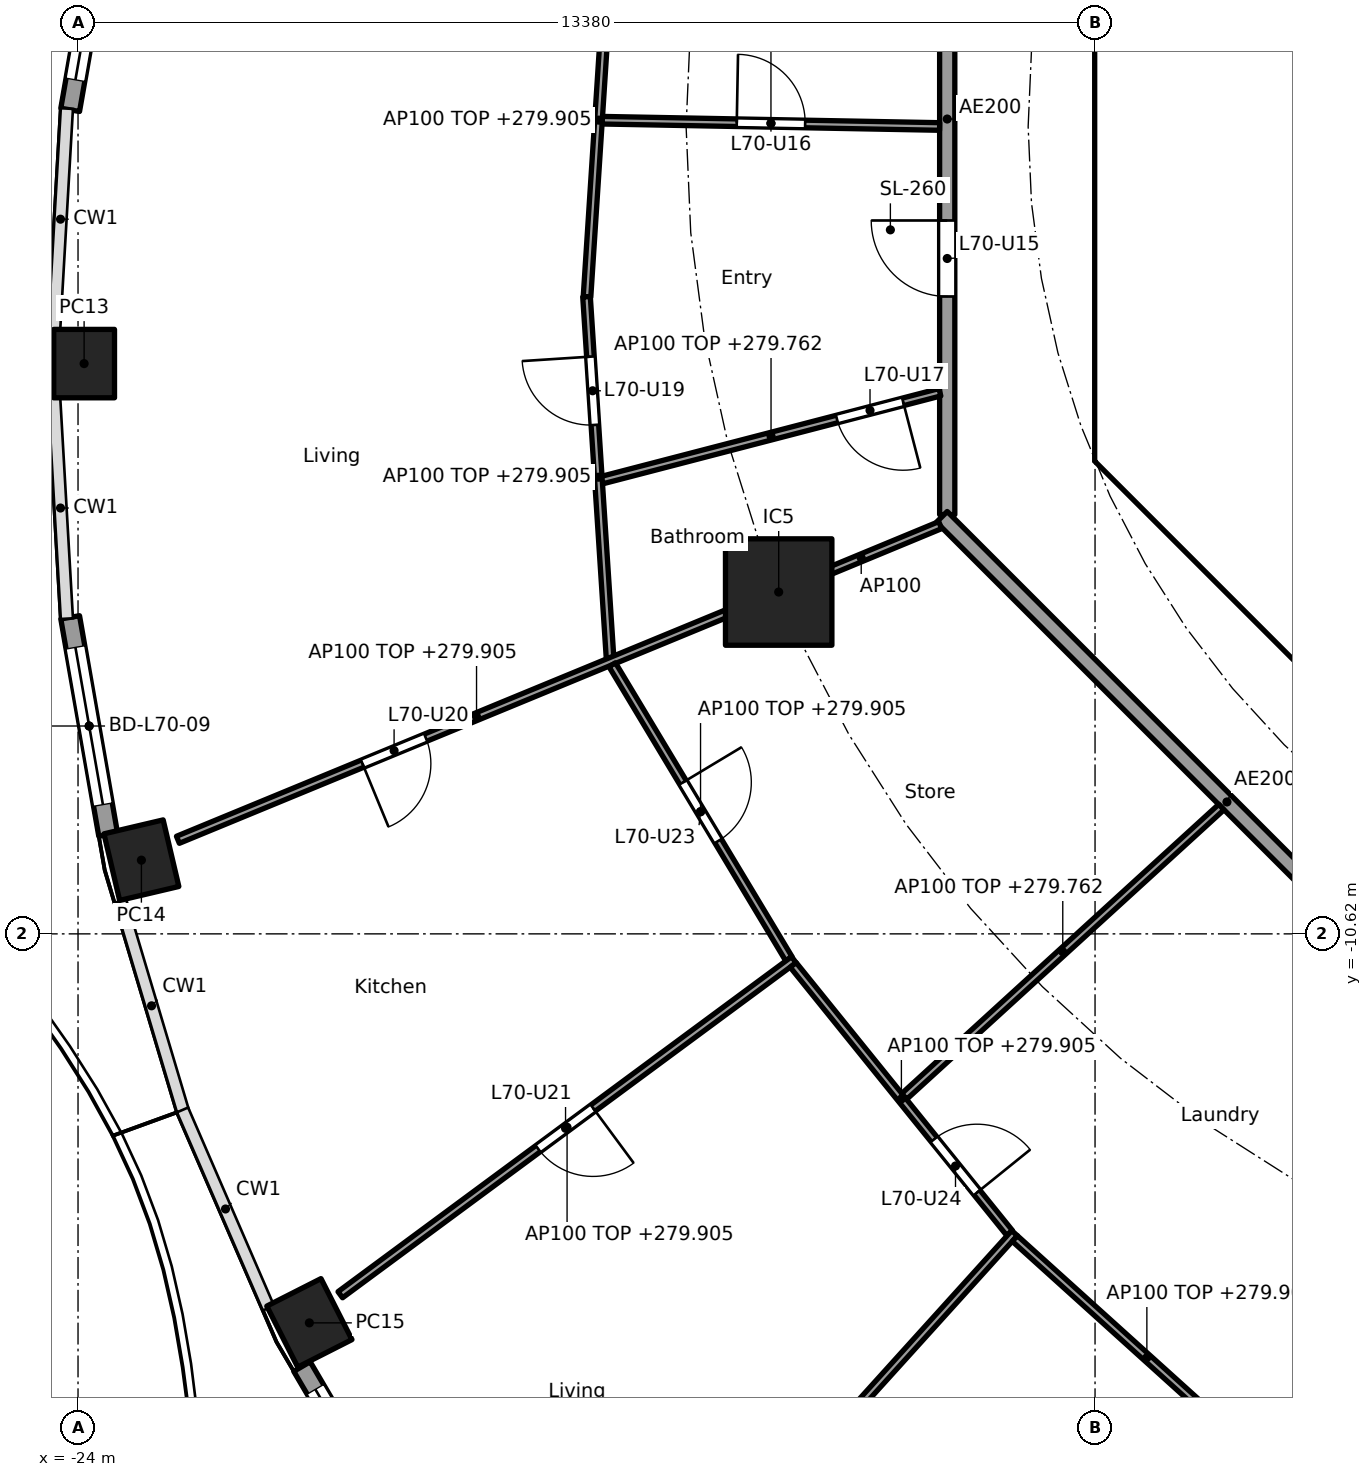
"""IFC4 building model, lengths in metres.
Left out: names, types, materials, properties, quantities, classifications, styles, units other than length and angle.
Written with IfcOpenShell. Run it as: python <this file> out.ifc"""

import sys

from ifc_helpers import new_model, si_unit, direction, frame, frame_2d, origin, origin_2d, place, context, subcontext, project, spatial, polyline, rectangle, hollow_rectangle, outline, extrude, element, fill, save


model = new_model("IFC4")
c1 = context("Model", 3, precision=1e-05, world=origin(), true_north=direction((0.0, 1.0)))
c2 = subcontext(c1, "Body", "Model", "MODEL_VIEW")
j1 = project(units=[si_unit("LENGTHUNIT", "METRE"), si_unit("PLANEANGLEUNIT", "RADIAN")], contexts=[c1])
p1 = place(None, origin())
s1 = spatial("IfcSite", under=j1, at=p1, CompositionType="ELEMENT")
p2 = place(p1, origin())
s2 = spatial("IfcBuilding", under=s1, at=p2, CompositionType="ELEMENT")
p3 = place(p2, frame((0.0, 0.0, 277.0)))
s3 = spatial("IfcBuildingStorey", under=s2, at=p3, CompositionType="ELEMENT", Elevation=277.0)
for number, where, z_axis, x_axis in (
    (1, (-23.92, -3.118, 0.0), (0.0, 0.0, 1.0), (0.0, -1.0, 0.0)),
    (2, (-23.166, -9.65, 0.0), (0.0, 0.0, 1.0), (0.229, -0.973, 0.0)),
    (3, (-20.957, -15.738, 0.0), (0.0, 0.0, 1.0), (0.452, -0.892, 0.0)),
):
    element("IfcColumn", number, at=place(p3, frame(where, z_axis=z_axis, x_axis=x_axis)), inside=s3, PredefinedType="COLUMN", context=c2, shape_type="SweptSolid", body=[
        extrude(hollow_rectangle(XDim=0.9, YDim=0.8, WallThickness=0.028, at=origin_2d()), origin(), (0.0, 0.0, 1.0), 3.7),
    ])
p4 = place(p3, frame((-14.782, -6.123, 0.0), z_axis=(0.0, 0.0, 1.0), x_axis=(1.0, 0.0, 0.0)))
e4 = element("IfcColumn", 4, at=p4, inside=s3, PredefinedType="COLUMN", context=c2, shape_type="SweptSolid", body=[
    extrude(rectangle(XDim=1.4, YDim=1.4, at=origin_2d()), origin(), (0.0, 0.0, 1.0), 3.7),
])
p5 = place(p3, frame((-24.103, 0.22, 0.0), z_axis=(0.0, 0.0, 1.0), x_axis=(0.172182411767, 0.985065082661, 0.0)))
e5 = element("IfcWall", 5, at=p5, inside=s3, PredefinedType="SOLIDWALL", context=c2, shape_type="SweptSolid", body=[
    extrude(rectangle(XDim=2.903, YDim=0.25, at=frame_2d((1.451, 0.0))), origin(), (0.0, 0.0, 1.0), 3.44),
])
p6 = place(p5, frame((0.401, 0.0, 0.0)))
e6 = element("IfcOpeningElement", 6, at=p6, cuts=e5, PredefinedType="OPENING", context=c2, shape_type="SweptSolid", body=[
    extrude(rectangle(XDim=2.1, YDim=2.4, at=frame_2d((1.05, 1.2))), frame((0.0, 0.135, 0.0), z_axis=(0.0, -1.0, 0.0), x_axis=(1.0, 0.0, 0.0)), (0.0, 0.0, 1.0), 0.27),
])
p7 = place(p3, frame((-23.604, -9.315, 0.0), z_axis=(0.0, 0.0, 1.0), x_axis=(-0.172182411767, 0.985065082661, 0.0)))
e7 = element("IfcWall", 7, at=p7, inside=s3, PredefinedType="SOLIDWALL", context=c2, shape_type="SweptSolid", body=[
    extrude(rectangle(XDim=2.903, YDim=0.25, at=frame_2d((1.451, 0.0))), origin(), (0.0, 0.0, 1.0), 3.44),
])
p8 = place(p7, frame((0.401, 0.0, 0.0)))
e8 = element("IfcOpeningElement", 8, at=p8, cuts=e7, PredefinedType="OPENING", context=c2, shape_type="SweptSolid", body=[
    extrude(rectangle(XDim=2.1, YDim=2.4, at=frame_2d((1.05, 1.2))), frame((0.0, 0.135, 0.0), z_axis=(0.0, -1.0, 0.0), x_axis=(1.0, 0.0, 0.0)), (0.0, 0.0, 1.0), 0.27),
])
p9 = place(p3, frame((-19.638, -18.724, 0.0), z_axis=(0.0, 0.0, 1.0), x_axis=(-0.506371364425, 0.862315511452, 0.0)))
e9 = element("IfcWall", 9, at=p9, inside=s3, PredefinedType="SOLIDWALL", context=c2, shape_type="SweptSolid", body=[
    extrude(rectangle(XDim=2.796, YDim=0.25, at=frame_2d((1.398, 0.0))), origin(), (0.0, 0.0, 1.0), 3.44),
])
p10 = place(p9, frame((0.348, 0.0, 0.0)))
e10 = element("IfcOpeningElement", 10, at=p10, cuts=e9, PredefinedType="OPENING", context=c2, shape_type="SweptSolid", body=[
    extrude(rectangle(XDim=2.1, YDim=2.4, at=frame_2d((1.05, 1.2))), frame((0.0, 0.135, 0.0), z_axis=(0.0, -1.0, 0.0), x_axis=(1.0, 0.0, 0.0)), (0.0, 0.0, 1.0), 0.27),
])
p11 = place(p3, frame((-10.325, 3.801, 0.0), z_axis=(0.0, 0.0, 1.0), x_axis=(0.0, -1.0, 0.0)))
e11 = element("IfcWall", 11, at=p11, inside=s3, PredefinedType="SHEAR", context=c2, shape_type="SweptSolid", body=[
    extrude(rectangle(XDim=7.602, YDim=0.6, at=frame_2d((3.801, 0.0))), origin(), (0.0, 0.0, 1.0), 3.44),
])
p12 = place(p11, frame((0.651, 0.0, 0.0)))
e12 = element("IfcOpeningElement", 12, at=p12, cuts=e11, PredefinedType="OPENING", context=c2, shape_type="SweptSolid", body=[
    extrude(rectangle(XDim=1.5, YDim=2.1, at=frame_2d((0.75, 1.05))), frame((0.0, 0.31, 0.0), z_axis=(0.0, -1.0, 0.0), x_axis=(1.0, 0.0, 0.0)), (0.0, 0.0, 1.0), 0.62),
])
p13 = place(p11, frame((5.451, 0.0, 0.0)))
e13 = element("IfcOpeningElement", 13, at=p13, cuts=e11, PredefinedType="OPENING", context=c2, shape_type="SweptSolid", body=[
    extrude(rectangle(XDim=1.5, YDim=2.1, at=frame_2d((0.75, 1.05))), frame((0.0, 0.31, 0.0), z_axis=(0.0, -1.0, 0.0), x_axis=(1.0, 0.0, 0.0)), (0.0, 0.0, 1.0), 0.62),
])
p14 = place(p3, frame((-9.988, -4.613, 0.0), z_axis=(0.0, 0.0, 1.0), x_axis=(0.707106781187, -0.707106781187, 0.0)))
e14 = element("IfcWall", 14, at=p14, inside=s3, PredefinedType="SHEAR", context=c2, shape_type="SweptSolid", body=[
    extrude(rectangle(XDim=7.602, YDim=0.6, at=frame_2d((3.801, 0.0))), origin(), (0.0, 0.0, 1.0), 3.44),
])
p15 = place(p14, frame((6.151, 0.0, 0.0)))
e15 = element("IfcOpeningElement", 15, at=p15, cuts=e14, PredefinedType="OPENING", context=c2, shape_type="SweptSolid", body=[
    extrude(rectangle(XDim=1.1, YDim=2.1, at=frame_2d((0.55, 1.05))), frame((0.0, 0.31, 0.0), z_axis=(0.0, -1.0, 0.0), x_axis=(1.0, 0.0, 0.0)), (0.0, 0.0, 1.0), 0.62),
])
p16 = place(p3, origin())
e16 = element("IfcWall", 16, at=p16, inside=s3, PredefinedType="SHEAR", context=c2, shape_type="SweptSolid", body=[
    extrude(outline(polyline([(-10.625, -3.801), (-10.025, -3.801), (-10.025, -4.152), (-9.776, -4.401), (-10.2, -4.825), (-10.625, -4.401), (-10.625, -3.801)])), origin(), (0.0, 0.0, 1.0), 3.44),
])
p17 = place(p3, frame((-10.025, -4.0, 0.0), z_axis=(0.0, 0.0, 1.0), x_axis=(1.0, 0.0, 0.0)))
e17 = element("IfcWall", 17, at=p17, inside=s3, PredefinedType="PARTITIONING", context=c2, shape_type="SweptSolid", body=[
    extrude(rectangle(XDim=3.325, YDim=0.2, at=frame_2d((1.662, 0.0))), origin(), (0.0, 0.0, 1.0), 3.44),
])
p18 = place(p3, frame((-8.301, -5.8, 0.0), z_axis=(0.0, 0.0, 1.0), x_axis=(1.0, 0.0, 0.0)))
e18 = element("IfcWall", 18, at=p18, inside=s3, PredefinedType="PARTITIONING", context=c2, shape_type="SweptSolid", body=[
    extrude(rectangle(XDim=2.026, YDim=0.15, at=frame_2d((1.013, 0.0))), origin(), (0.0, 0.0, 1.0), 3.44),
])
p19 = place(p3, frame((-6.151, -14.824, 0.0), z_axis=(0.0, 0.0, 1.0), x_axis=(-0.549345577828, -0.835595258556, 0.0)))
e19 = element("IfcWall", 19, at=p19, inside=s3, PredefinedType="PARTITIONING", context=c2, shape_type="SweptSolid", body=[
    extrude(rectangle(XDim=11.62, YDim=0.2, at=frame_2d((5.81, 0.0))), origin(), (0.0, 0.0, 1.0), 2.905),
])
p20 = place(p3, frame((-12.565, 5.304, 0.0), z_axis=(0.0, 0.0, 1.0), x_axis=(0.0, -1.0, 0.0)))
e20 = element("IfcWall", 20, at=p20, inside=s3, PredefinedType="PARTITIONING", context=c2, shape_type="SweptSolid", body=[
    extrude(rectangle(XDim=10.409, YDim=0.2, at=frame_2d((5.205, 0.0))), origin(), (0.0, 0.0, 1.0), 3.44),
])
p21 = place(p20, frame((6.539, 0.0, 0.0)))
e21 = element("IfcOpeningElement", 21, at=p21, cuts=e20, PredefinedType="OPENING", context=c2, shape_type="SweptSolid", body=[
    extrude(rectangle(XDim=1.0, YDim=2.1, at=frame_2d((0.5, 1.05))), frame((0.0, 0.11, 0.0), z_axis=(0.0, -1.0, 0.0), x_axis=(1.0, 0.0, 0.0)), (0.0, 0.0, 1.0), 0.22),
])
p22 = place(p3, frame((-12.635, -5.134, 0.0), z_axis=(0.0, 0.0, 1.0), x_axis=(0.707106781187, -0.707106781187, 0.0)))
e22 = element("IfcWall", 22, at=p22, inside=s3, PredefinedType="PARTITIONING", context=c2, shape_type="SweptSolid", body=[
    extrude(rectangle(XDim=10.609, YDim=0.2, at=frame_2d((5.305, 0.0))), origin(), (0.0, 0.0, 1.0), 3.44),
])
p23 = place(p3, frame((-17.002, 2.409, 0.0), z_axis=(0.0, 0.0, 1.0), x_axis=(-0.064855550758, -0.997894662545, 0.0)))
e23 = element("IfcWall", 23, at=p23, inside=s3, PredefinedType="PARTITIONING", context=c2, shape_type="SweptSolid", body=[
    extrude(rectangle(XDim=4.656, YDim=0.1, at=frame_2d((2.328, 0.0))), origin(), (0.0, 0.0, 1.0), 2.905),
])
p24 = place(p3, frame((-12.665, 0.002, 0.0), z_axis=(0.0, 0.0, 1.0), x_axis=(-0.999827178165, 0.018590691287, 0.0)))
e24 = element("IfcWall", 24, at=p24, inside=s3, PredefinedType="PARTITIONING", context=c2, shape_type="SweptSolid", body=[
    extrude(rectangle(XDim=4.439, YDim=0.1, at=frame_2d((2.219, 0.0))), origin(), (0.0, 0.0, 1.0), 2.762),
])
p25 = place(p24, frame((1.769, 0.0, 0.0)))
e25 = element("IfcOpeningElement", 25, at=p25, cuts=e24, PredefinedType="OPENING", context=c2, shape_type="SweptSolid", body=[
    extrude(rectangle(XDim=0.9, YDim=2.1, at=frame_2d((0.45, 1.05))), frame((0.0, 0.06, 0.0), z_axis=(0.0, -1.0, 0.0), x_axis=(1.0, 0.0, 0.0)), (0.0, 0.0, 1.0), 0.12),
])
p26 = place(p3, frame((-17.31, -2.238, 0.0), z_axis=(0.0, 0.0, 1.0), x_axis=(0.064949202176, -0.997888571503, 0.0)))
e26 = element("IfcWall", 26, at=p26, inside=s3, PredefinedType="PARTITIONING", context=c2, shape_type="SweptSolid", body=[
    extrude(rectangle(XDim=4.759, YDim=0.1, at=frame_2d((2.379, 0.0))), origin(), (0.0, 0.0, 1.0), 2.905),
])
p27 = place(p26, frame((0.79, 0.0, 0.0)))
e27 = element("IfcOpeningElement", 27, at=p27, cuts=e26, PredefinedType="OPENING", context=c2, shape_type="SweptSolid", body=[
    extrude(rectangle(XDim=0.9, YDim=2.1, at=frame_2d((0.45, 1.05))), frame((0.0, 0.06, 0.0), z_axis=(0.0, -1.0, 0.0), x_axis=(1.0, 0.0, 0.0)), (0.0, 0.0, 1.0), 0.12),
])
p28 = place(p3, frame((-12.662, -3.495, 0.0), z_axis=(0.0, 0.0, 1.0), x_axis=(-0.967834941053, -0.251586022817, 0.0)))
e28 = element("IfcWall", 28, at=p28, inside=s3, PredefinedType="PARTITIONING", context=c2, shape_type="SweptSolid", body=[
    extrude(rectangle(XDim=4.59, YDim=0.1, at=frame_2d((2.295, 0.0))), origin(), (0.0, 0.0, 1.0), 2.762),
])
p29 = place(p28, frame((0.5, 0.0, 0.0)))
e29 = element("IfcOpeningElement", 29, at=p29, cuts=e28, PredefinedType="OPENING", context=c2, shape_type="SweptSolid", body=[
    extrude(rectangle(XDim=0.9, YDim=2.1, at=frame_2d((0.45, 1.05))), frame((0.0, 0.06, 0.0), z_axis=(0.0, -1.0, 0.0), x_axis=(1.0, 0.0, 0.0)), (0.0, 0.0, 1.0), 0.12),
])
p30 = place(p3, frame((-12.657, -5.243, 0.0), z_axis=(0.0, 0.0, 1.0), x_axis=(-0.923871314276, -0.382703272338, 0.0)))
e30 = element("IfcWall", 30, at=p30, inside=s3, PredefinedType="PARTITIONING", context=c2, shape_type="SweptSolid", body=[
    extrude(rectangle(XDim=2.249, YDim=0.1, at=frame_2d((1.125, 0.0))), origin(), (0.0, 0.0, 1.0), 3.44),
])
p31 = place(p3, frame((-14.828, -6.142, 0.0), z_axis=(0.0, 0.0, 1.0), x_axis=(-0.924478087429, -0.381235184451, 0.0)))
e31 = element("IfcWall", 31, at=p31, inside=s3, PredefinedType="PARTITIONING", context=c2, shape_type="SweptSolid", body=[
    extrude(rectangle(XDim=8.499, YDim=0.1, at=frame_2d((4.25, 0.0))), origin(), (0.0, 0.0, 1.0), 2.905),
])
p32 = place(p31, frame((4.973, 0.0, 0.0)))
e32 = element("IfcOpeningElement", 32, at=p32, cuts=e31, PredefinedType="OPENING", context=c2, shape_type="SweptSolid", body=[
    extrude(rectangle(XDim=0.9, YDim=2.1, at=frame_2d((0.45, 1.05))), frame((0.0, 0.06, 0.0), z_axis=(0.0, -1.0, 0.0), x_axis=(1.0, 0.0, 0.0)), (0.0, 0.0, 1.0), 0.12),
])
p33 = place(p3, frame((-16.972, -7.08, 0.0), z_axis=(0.0, 0.0, 1.0), x_axis=(0.514989049311, -0.857196756346, 0.0)))
e33 = element("IfcWall", 33, at=p33, inside=s3, PredefinedType="PARTITIONING", context=c2, shape_type="SweptSolid", body=[
    extrude(rectangle(XDim=4.512, YDim=0.1, at=frame_2d((2.256, 0.0))), origin(), (0.0, 0.0, 1.0), 2.905),
])
p34 = place(p33, frame((1.806, 0.0, 0.0)))
e34 = element("IfcOpeningElement", 34, at=p34, cuts=e33, PredefinedType="OPENING", context=c2, shape_type="SweptSolid", body=[
    extrude(rectangle(XDim=0.9, YDim=2.1, at=frame_2d((0.45, 1.05))), frame((0.0, 0.06, 0.0), z_axis=(0.0, -1.0, 0.0), x_axis=(1.0, 0.0, 0.0)), (0.0, 0.0, 1.0), 0.12),
])
p35 = place(p3, frame((-14.582, -10.96, 0.0), z_axis=(0.0, 0.0, 1.0), x_axis=(-0.804405200554, -0.594081032623, 0.0)))
e35 = element("IfcWall", 35, at=p35, inside=s3, PredefinedType="PARTITIONING", context=c2, shape_type="SweptSolid", body=[
    extrude(rectangle(XDim=7.418, YDim=0.1, at=frame_2d((3.709, 0.0))), origin(), (0.0, 0.0, 1.0), 2.905),
])
p36 = place(p35, frame((3.284, 0.0, 0.0)))
e36 = element("IfcOpeningElement", 36, at=p36, cuts=e35, PredefinedType="OPENING", context=c2, shape_type="SweptSolid", body=[
    extrude(rectangle(XDim=0.9, YDim=2.1, at=frame_2d((0.45, 1.05))), frame((0.0, 0.06, 0.0), z_axis=(0.0, -1.0, 0.0), x_axis=(1.0, 0.0, 0.0)), (0.0, 0.0, 1.0), 0.12),
])
p37 = place(p3, frame((-14.591, -11.029, 0.0), z_axis=(0.0, 0.0, 1.0), x_axis=(0.628170338674, -0.778075848237, 0.0)))
e37 = element("IfcWall", 37, at=p37, inside=s3, PredefinedType="PARTITIONING", context=c2, shape_type="SweptSolid", body=[
    extrude(rectangle(XDim=4.532, YDim=0.1, at=frame_2d((2.266, 0.0))), origin(), (0.0, 0.0, 1.0), 2.905),
])
p38 = place(p37, frame((2.949, 0.0, 0.0)))
e38 = element("IfcOpeningElement", 38, at=p38, cuts=e37, PredefinedType="OPENING", context=c2, shape_type="SweptSolid", body=[
    extrude(rectangle(XDim=0.9, YDim=2.1, at=frame_2d((0.45, 1.05))), frame((0.0, 0.06, 0.0), z_axis=(0.0, -1.0, 0.0), x_axis=(1.0, 0.0, 0.0)), (0.0, 0.0, 1.0), 0.12),
])
p39 = place(p3, frame((-8.958, -8.952, 0.0), z_axis=(0.0, 0.0, 1.0), x_axis=(-0.73876526954, -0.673962815385, 0.0)))
e39 = element("IfcWall", 39, at=p39, inside=s3, PredefinedType="PARTITIONING", context=c2, shape_type="SweptSolid", body=[
    extrude(rectangle(XDim=5.647, YDim=0.1, at=frame_2d((2.824, 0.0))), origin(), (0.0, 0.0, 1.0), 2.762),
])
p40 = place(p3, frame((-11.679, -14.557, 0.0), z_axis=(0.0, 0.0, 1.0), x_axis=(-0.670800011545, -0.741638284146, 0.0)))
e40 = element("IfcWall", 40, at=p40, inside=s3, PredefinedType="PARTITIONING", context=c2, shape_type="SweptSolid", body=[
    extrude(rectangle(XDim=8.068, YDim=0.1, at=frame_2d((4.034, 0.0))), origin(), (0.0, 0.0, 1.0), 2.905),
])
p41 = place(p40, frame((3.609, 0.0, 0.0)))
e41 = element("IfcOpeningElement", 41, at=p41, cuts=e40, PredefinedType="OPENING", context=c2, shape_type="SweptSolid", body=[
    extrude(rectangle(XDim=0.9, YDim=2.1, at=frame_2d((0.45, 1.05))), frame((0.0, 0.06, 0.0), z_axis=(0.0, -1.0, 0.0), x_axis=(1.0, 0.0, 0.0)), (0.0, 0.0, 1.0), 0.12),
])
p42 = place(p3, frame((-11.676, -14.628, 0.0), z_axis=(0.0, 0.0, 1.0), x_axis=(0.74245829867, -0.669892285921, 0.0)))
e42 = element("IfcWall", 42, at=p42, inside=s3, PredefinedType="PARTITIONING", context=c2, shape_type="SweptSolid", body=[
    extrude(rectangle(XDim=4.68, YDim=0.1, at=frame_2d((2.34, 0.0))), origin(), (0.0, 0.0, 1.0), 2.905),
])
p43 = place(p6, origin())
e43 = element("IfcDoor", 43, at=p43, inside=s3, OperationType="SLIDING_TO_LEFT", PredefinedType="DOOR", context=c2, shape_type="SweptSolid", body=[
    extrude(rectangle(XDim=2.1, YDim=2.4, at=frame_2d((1.05, 1.2))), frame((0.0, 0.025, 0.0), z_axis=(0.0, -1.0, 0.0), x_axis=(1.0, 0.0, 0.0)), (0.0, 0.0, 1.0), 0.05),
])
fill(e6, e43)
p44 = place(p8, origin())
e44 = element("IfcDoor", 44, at=p44, inside=s3, OperationType="SLIDING_TO_LEFT", PredefinedType="DOOR", context=c2, shape_type="SweptSolid", body=[
    extrude(rectangle(XDim=2.1, YDim=2.4, at=frame_2d((1.05, 1.2))), frame((0.0, 0.025, 0.0), z_axis=(0.0, -1.0, 0.0), x_axis=(1.0, 0.0, 0.0)), (0.0, 0.0, 1.0), 0.05),
])
fill(e8, e44)
p45 = place(p10, origin())
e45 = element("IfcDoor", 45, at=p45, inside=s3, OperationType="SLIDING_TO_LEFT", PredefinedType="DOOR", context=c2, shape_type="SweptSolid", body=[
    extrude(rectangle(XDim=2.1, YDim=2.4, at=frame_2d((1.05, 1.2))), frame((0.0, 0.025, 0.0), z_axis=(0.0, -1.0, 0.0), x_axis=(1.0, 0.0, 0.0)), (0.0, 0.0, 1.0), 0.05),
])
fill(e10, e45)
p46 = place(p13, origin())
e46 = element("IfcDoor", 46, at=p46, inside=s3, OperationType="DOUBLE_DOOR_SINGLE_SWING", PredefinedType="DOOR", context=c2, shape_type="SweptSolid", body=[
    extrude(rectangle(XDim=1.5, YDim=2.1, at=frame_2d((0.75, 1.05))), frame((0.0, 0.025, 0.0), z_axis=(0.0, -1.0, 0.0), x_axis=(1.0, 0.0, 0.0)), (0.0, 0.0, 1.0), 0.05),
])
fill(e13, e46)
p47 = place(p21, frame((1.0, 0.0, 0.0), x_axis=(-1.0, 0.0, 0.0)))
e47 = element("IfcDoor", 47, at=p47, inside=s3, OperationType="SINGLE_SWING_RIGHT", PredefinedType="DOOR", context=c2, shape_type="SweptSolid", body=[
    extrude(rectangle(XDim=1.0, YDim=2.1, at=frame_2d((0.5, 1.05))), frame((0.0, 0.025, 0.0), z_axis=(0.0, -1.0, 0.0), x_axis=(1.0, 0.0, 0.0)), (0.0, 0.0, 1.0), 0.05),
])
fill(e21, e47)
p48 = place(p25, frame((0.9, 0.0, 0.0), x_axis=(-1.0, 0.0, 0.0)))
e48 = element("IfcDoor", 48, at=p48, inside=s3, OperationType="SINGLE_SWING_LEFT", PredefinedType="DOOR", context=c2, shape_type="SweptSolid", body=[
    extrude(rectangle(XDim=0.9, YDim=2.1, at=frame_2d((0.45, 1.05))), frame((0.0, 0.025, 0.0), z_axis=(0.0, -1.0, 0.0), x_axis=(1.0, 0.0, 0.0)), (0.0, 0.0, 1.0), 0.05),
])
fill(e25, e48)
p49 = place(p29, origin())
e49 = element("IfcDoor", 49, at=p49, inside=s3, OperationType="SINGLE_SWING_LEFT", PredefinedType="DOOR", context=c2, shape_type="SweptSolid", body=[
    extrude(rectangle(XDim=0.9, YDim=2.1, at=frame_2d((0.45, 1.05))), frame((0.0, 0.025, 0.0), z_axis=(0.0, -1.0, 0.0), x_axis=(1.0, 0.0, 0.0)), (0.0, 0.0, 1.0), 0.05),
])
fill(e29, e49)
p50 = place(p27, frame((0.9, 0.0, 0.0), x_axis=(-1.0, 0.0, 0.0)))
e50 = element("IfcDoor", 50, at=p50, inside=s3, OperationType="SINGLE_SWING_RIGHT", PredefinedType="DOOR", context=c2, shape_type="SweptSolid", body=[
    extrude(rectangle(XDim=0.9, YDim=2.1, at=frame_2d((0.45, 1.05))), frame((0.0, 0.025, 0.0), z_axis=(0.0, -1.0, 0.0), x_axis=(1.0, 0.0, 0.0)), (0.0, 0.0, 1.0), 0.05),
])
fill(e27, e50)
p51 = place(p32, origin())
e51 = element("IfcDoor", 51, at=p51, inside=s3, OperationType="SINGLE_SWING_RIGHT", PredefinedType="DOOR", context=c2, shape_type="SweptSolid", body=[
    extrude(rectangle(XDim=0.9, YDim=2.1, at=frame_2d((0.45, 1.05))), frame((0.0, 0.025, 0.0), z_axis=(0.0, -1.0, 0.0), x_axis=(1.0, 0.0, 0.0)), (0.0, 0.0, 1.0), 0.05),
])
fill(e32, e51)
p52 = place(p36, origin())
e52 = element("IfcDoor", 52, at=p52, inside=s3, OperationType="SINGLE_SWING_LEFT", PredefinedType="DOOR", context=c2, shape_type="SweptSolid", body=[
    extrude(rectangle(XDim=0.9, YDim=2.1, at=frame_2d((0.45, 1.05))), frame((0.0, 0.025, 0.0), z_axis=(0.0, -1.0, 0.0), x_axis=(1.0, 0.0, 0.0)), (0.0, 0.0, 1.0), 0.05),
])
fill(e36, e52)
p53 = place(p34, origin())
e53 = element("IfcDoor", 53, at=p53, inside=s3, OperationType="SINGLE_SWING_LEFT", PredefinedType="DOOR", context=c2, shape_type="SweptSolid", body=[
    extrude(rectangle(XDim=0.9, YDim=2.1, at=frame_2d((0.45, 1.05))), frame((0.0, 0.025, 0.0), z_axis=(0.0, -1.0, 0.0), x_axis=(1.0, 0.0, 0.0)), (0.0, 0.0, 1.0), 0.05),
])
fill(e34, e53)
p54 = place(p38, origin())
e54 = element("IfcDoor", 54, at=p54, inside=s3, OperationType="SINGLE_SWING_RIGHT", PredefinedType="DOOR", context=c2, shape_type="SweptSolid", body=[
    extrude(rectangle(XDim=0.9, YDim=2.1, at=frame_2d((0.45, 1.05))), frame((0.0, 0.025, 0.0), z_axis=(0.0, -1.0, 0.0), x_axis=(1.0, 0.0, 0.0)), (0.0, 0.0, 1.0), 0.05),
])
fill(e38, e54)
save(model, sys.argv[1])
